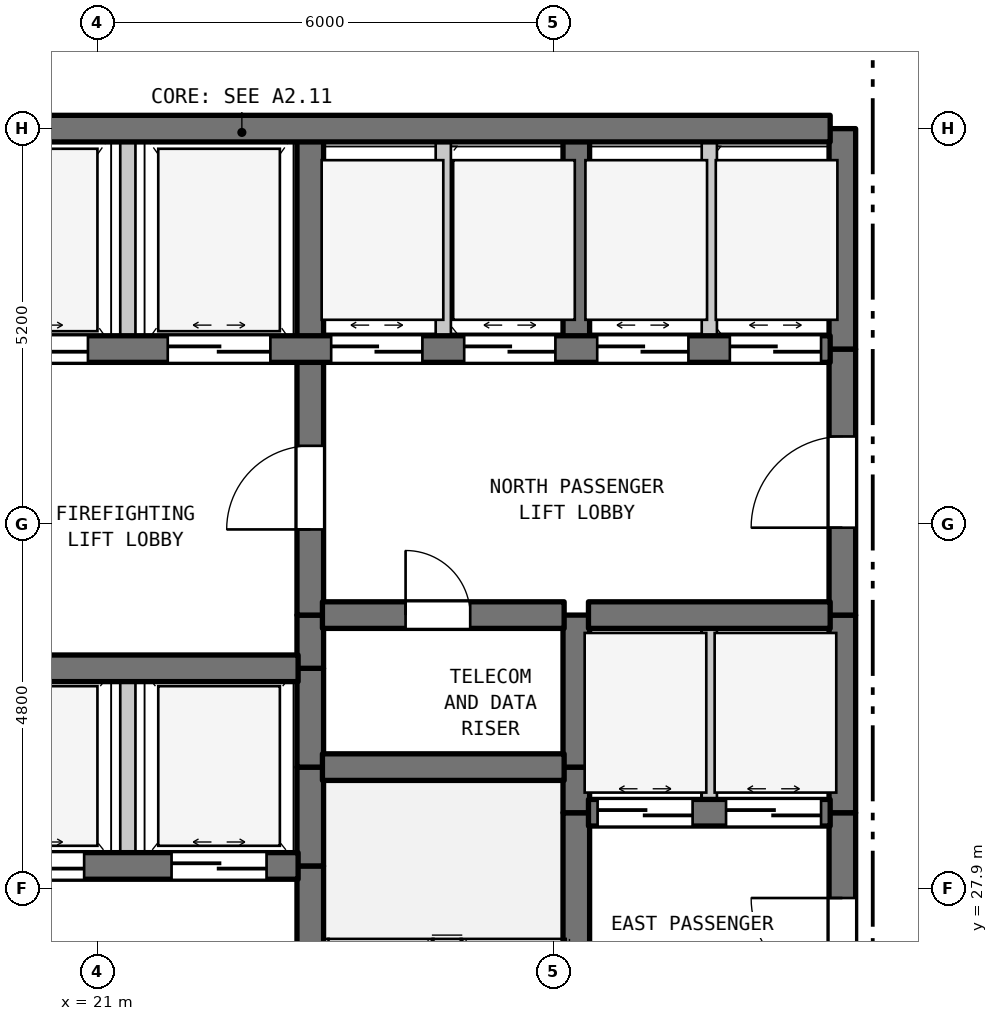
"""IFC4 building model, lengths in metres.
Left out: names, types, materials, properties, quantities, classifications, styles, units other than length and angle.
Written with IfcOpenShell. Run it as: python <this file> out.ifc"""

import sys

from ifc_helpers import new_model, si_unit, direction, frame, frame_2d, origin, place, context, subcontext, project, spatial, rectangle, extrude, element, fill, save


model = new_model("IFC4")
c1 = context("Model", 3, precision=1e-05, world=origin(), true_north=direction((0.0, 1.0)))
c2 = subcontext(c1, "Body", "Model", "MODEL_VIEW")
j1 = project(units=[si_unit("LENGTHUNIT", "METRE"), si_unit("PLANEANGLEUNIT", "RADIAN")], contexts=[c1])
p1 = place(None, origin())
s1 = spatial("IfcSite", under=j1, at=p1, CompositionType="ELEMENT")
p2 = place(p1, origin())
s2 = spatial("IfcBuilding", under=s1, at=p2, CompositionType="ELEMENT")
p3 = place(p2, frame((0.0, 0.0, 102.0)))
s3 = spatial("IfcBuildingStorey", under=s2, at=p3, CompositionType="ELEMENT", Elevation=102.0)
p4 = place(p3, frame((21.4, 28.2, 0.0), z_axis=(0.0, 0.0, 1.0), x_axis=(0.0, 1.0, 0.0)))
e1 = element("IfcWall", 1, at=p4, inside=s3, PredefinedType="STANDARD", context=c2, shape_type="SweptSolid", body=[
    extrude(rectangle(XDim=2.6, YDim=0.2, at=frame_2d((1.3, 0.0))), origin(), (0.0, 0.0, 1.0), 3.385),
])
p5 = place(p3, frame((21.4, 35.0, 0.0), z_axis=(0.0, 0.0, 1.0), x_axis=(0.0, 1.0, 0.0)))
e2 = element("IfcWall", 2, at=p5, inside=s3, PredefinedType="STANDARD", context=c2, shape_type="SweptSolid", body=[
    extrude(rectangle(XDim=2.9, YDim=0.2, at=frame_2d((1.45, 0.0))), origin(), (0.0, 0.0, 1.0), 3.385),
])
p6 = place(p3, frame((23.8, 22.7, 0.0), z_axis=(0.0, 0.0, 1.0), x_axis=(0.0, 1.0, 0.0)))
e3 = element("IfcWall", 3, at=p6, inside=s3, PredefinedType="SHEAR", context=c2, shape_type="SweptSolid", body=[
    extrude(rectangle(XDim=5.5, YDim=0.35, at=frame_2d((2.75, 0.0))), origin(), (0.0, 0.0, 1.0), 3.385),
])
p7 = place(p6, frame((0.235, 0.0, 0.0)))
e4 = element("IfcOpeningElement", 4, at=p7, cuts=e3, PredefinedType="OPENING", context=c2, shape_type="SweptSolid", body=[
    extrude(rectangle(XDim=1.1, YDim=2.15, at=frame_2d((0.55, 1.075))), frame((0.0, 0.185, 0.0), z_axis=(0.0, -1.0, 0.0), x_axis=(1.0, 0.0, 0.0)), (0.0, 0.0, 1.0), 0.37),
])
for number, where, z_axis, x_axis in (
    (5, (23.8, 28.2, 0.0), (0.0, 0.0, 1.0), (0.0, 1.0, 0.0)),
    (6, (23.8, 29.5, 0.0), (0.0, 0.0, 1.0), (0.0, 1.0, 0.0)),
):
    element("IfcWall", number, at=place(p3, frame(where, z_axis=z_axis, x_axis=x_axis)), inside=s3, PredefinedType="SHEAR", context=c2, shape_type="SweptSolid", body=[
        extrude(rectangle(XDim=1.3, YDim=0.35, at=frame_2d((0.65, 0.0))), origin(), (0.0, 0.0, 1.0), 3.385),
    ])
p8 = place(p3, frame((23.8, 30.8, 0.0), z_axis=(0.0, 0.0, 1.0), x_axis=(0.0, 1.0, 0.0)))
e7 = element("IfcWall", 7, at=p8, inside=s3, PredefinedType="SHEAR", context=c2, shape_type="SweptSolid", body=[
    extrude(rectangle(XDim=0.7, YDim=0.35, at=frame_2d((0.35, 0.0))), origin(), (0.0, 0.0, 1.0), 3.385),
])
p9 = place(p3, frame((23.8, 31.5, 0.0), z_axis=(0.0, 0.0, 1.0), x_axis=(0.0, 1.0, 0.0)))
e8 = element("IfcWall", 8, at=p9, inside=s3, PredefinedType="SHEAR", context=c2, shape_type="SweptSolid", body=[
    extrude(rectangle(XDim=3.5, YDim=0.35, at=frame_2d((1.75, 0.0))), origin(), (0.0, 0.0, 1.0), 3.385),
])
p10 = place(p9, frame((1.127, 0.0, 0.0)))
e9 = element("IfcOpeningElement", 9, at=p10, cuts=e8, PredefinedType="OPENING", context=c2, shape_type="SweptSolid", body=[
    extrude(rectangle(XDim=1.1, YDim=2.15, at=frame_2d((0.55, 1.075))), frame((0.0, 0.185, 0.0), z_axis=(0.0, -1.0, 0.0), x_axis=(1.0, 0.0, 0.0)), (0.0, 0.0, 1.0), 0.37),
])
p11 = place(p3, frame((23.8, 35.0, 0.0), z_axis=(0.0, 0.0, 1.0), x_axis=(0.0, 1.0, 0.0)))
e10 = element("IfcWall", 10, at=p11, inside=s3, PredefinedType="SHEAR", context=c2, shape_type="SweptSolid", body=[
    extrude(rectangle(XDim=2.9, YDim=0.35, at=frame_2d((1.45, 0.0))), origin(), (0.0, 0.0, 1.0), 3.385),
])
p12 = place(p3, frame((25.55, 35.0, 0.0), z_axis=(0.0, 0.0, 1.0), x_axis=(0.0, 1.0, 0.0)))
e11 = element("IfcWall", 11, at=p12, inside=s3, PredefinedType="STANDARD", context=c2, shape_type="SweptSolid", body=[
    extrude(rectangle(XDim=2.9, YDim=0.2, at=frame_2d((1.45, 0.0))), origin(), (0.0, 0.0, 1.0), 3.385),
])
p13 = place(p3, frame((27.3, 25.6, 0.0), z_axis=(0.0, 0.0, 1.0), x_axis=(0.0, 1.0, 0.0)))
e12 = element("IfcWall", 12, at=p13, inside=s3, PredefinedType="SHEAR", context=c2, shape_type="SweptSolid", body=[
    extrude(rectangle(XDim=3.3, YDim=0.35, at=frame_2d((1.65, 0.0))), origin(), (0.0, 0.0, 1.0), 3.385),
])
p14 = place(p3, frame((27.3, 28.9, 0.0), z_axis=(0.0, 0.0, 1.0), x_axis=(0.0, 1.0, 0.0)))
e13 = element("IfcWall", 13, at=p14, inside=s3, PredefinedType="SHEAR", context=c2, shape_type="SweptSolid", body=[
    extrude(rectangle(XDim=0.6, YDim=0.35, at=frame_2d((0.3, 0.0))), origin(), (0.0, 0.0, 1.0), 3.385),
])
p15 = place(p3, frame((27.3, 29.5, 0.0), z_axis=(0.0, 0.0, 1.0), x_axis=(0.0, 1.0, 0.0)))
e14 = element("IfcWall", 14, at=p15, inside=s3, PredefinedType="SHEAR", context=c2, shape_type="SweptSolid", body=[
    extrude(rectangle(XDim=2.0, YDim=0.35, at=frame_2d((1.0, 0.0))), origin(), (0.0, 0.0, 1.0), 3.385),
])
p16 = place(p3, frame((27.3, 35.0, 0.0), z_axis=(0.0, 0.0, 1.0), x_axis=(0.0, 1.0, 0.0)))
e15 = element("IfcWall", 15, at=p16, inside=s3, PredefinedType="SHEAR", context=c2, shape_type="SweptSolid", body=[
    extrude(rectangle(XDim=2.9, YDim=0.35, at=frame_2d((1.45, 0.0))), origin(), (0.0, 0.0, 1.0), 3.385),
])
p17 = place(p3, frame((29.05, 28.9, 0.0), z_axis=(0.0, 0.0, 1.0), x_axis=(0.0, 1.0, 0.0)))
e16 = element("IfcWall", 16, at=p17, inside=s3, PredefinedType="STANDARD", context=c2, shape_type="SweptSolid", body=[
    extrude(rectangle(XDim=2.6, YDim=0.2, at=frame_2d((1.3, 0.0))), origin(), (0.0, 0.0, 1.0), 3.385),
])
p18 = place(p3, frame((29.05, 35.0, 0.0), z_axis=(0.0, 0.0, 1.0), x_axis=(0.0, 1.0, 0.0)))
e17 = element("IfcWall", 17, at=p18, inside=s3, PredefinedType="STANDARD", context=c2, shape_type="SweptSolid", body=[
    extrude(rectangle(XDim=2.9, YDim=0.2, at=frame_2d((1.45, 0.0))), origin(), (0.0, 0.0, 1.0), 3.385),
])
p19 = place(p3, frame((30.8, 25.6, 0.0), z_axis=(0.0, 0.0, 1.0), x_axis=(0.0, 1.0, 0.0)))
e18 = element("IfcWall", 18, at=p19, inside=s3, PredefinedType="SHEAR", context=c2, shape_type="SweptSolid", body=[
    extrude(rectangle(XDim=3.3, YDim=0.35, at=frame_2d((1.65, 0.0))), origin(), (0.0, 0.0, 1.0), 3.385),
])
p20 = place(p19, frame((0.978, 0.0, 0.0)))
e19 = element("IfcOpeningElement", 19, at=p20, cuts=e18, PredefinedType="OPENING", context=c2, shape_type="SweptSolid", body=[
    extrude(rectangle(XDim=1.2, YDim=2.2, at=frame_2d((0.6, 1.1))), frame((0.0, 0.185, 0.0), z_axis=(0.0, -1.0, 0.0), x_axis=(1.0, 0.0, 0.0)), (0.0, 0.0, 1.0), 0.37),
])
p21 = place(p3, frame((30.8, 28.9, 0.0), z_axis=(0.0, 0.0, 1.0), x_axis=(0.0, 1.0, 0.0)))
e20 = element("IfcWall", 20, at=p21, inside=s3, PredefinedType="SHEAR", context=c2, shape_type="SweptSolid", body=[
    extrude(rectangle(XDim=2.6, YDim=0.35, at=frame_2d((1.3, 0.0))), origin(), (0.0, 0.0, 1.0), 3.385),
])
p22 = place(p3, frame((30.8, 31.5, 0.0), z_axis=(0.0, 0.0, 1.0), x_axis=(0.0, 1.0, 0.0)))
e21 = element("IfcWall", 21, at=p22, inside=s3, PredefinedType="SHEAR", context=c2, shape_type="SweptSolid", body=[
    extrude(rectangle(XDim=3.5, YDim=0.35, at=frame_2d((1.75, 0.0))), origin(), (0.0, 0.0, 1.0), 3.385),
])
p23 = place(p22, frame((1.15, 0.0, 0.0)))
e22 = element("IfcOpeningElement", 22, at=p23, cuts=e21, PredefinedType="OPENING", context=c2, shape_type="SweptSolid", body=[
    extrude(rectangle(XDim=1.2, YDim=2.2, at=frame_2d((0.6, 1.1))), frame((0.0, 0.185, 0.0), z_axis=(0.0, -1.0, 0.0), x_axis=(1.0, 0.0, 0.0)), (0.0, 0.0, 1.0), 0.37),
])
p24 = place(p3, frame((30.8, 35.0, 0.0), z_axis=(0.0, 0.0, 1.0), x_axis=(0.0, 1.0, 0.0)))
e23 = element("IfcWall", 23, at=p24, inside=s3, PredefinedType="SHEAR", context=c2, shape_type="SweptSolid", body=[
    extrude(rectangle(XDim=2.9, YDim=0.35, at=frame_2d((1.45, 0.0))), origin(), (0.0, 0.0, 1.0), 3.385),
])
p25 = place(p3, frame((19.16, 28.2, 0.0), z_axis=(0.0, 0.0, 1.0), x_axis=(1.0, 0.0, 0.0)))
e24 = element("IfcWall", 24, at=p25, inside=s3, PredefinedType="SHEAR", context=c2, shape_type="SweptSolid", body=[
    extrude(rectangle(XDim=4.48, YDim=0.35, at=frame_2d((2.24, 0.0))), origin(), (0.0, 0.0, 1.0), 3.385),
])
p26 = place(p25, frame((0.415, 0.0, 0.0)))
e25 = element("IfcOpeningElement", 25, at=p26, cuts=e24, PredefinedType="OPENING", context=c2, shape_type="SweptSolid", body=[
    extrude(rectangle(XDim=1.25, YDim=2.2, at=frame_2d((0.625, 1.1))), frame((0.0, 0.185, 0.0), z_axis=(0.0, -1.0, 0.0), x_axis=(1.0, 0.0, 0.0)), (0.0, 0.0, 1.0), 0.37),
])
p27 = place(p25, frame((2.815, 0.0, 0.0)))
e26 = element("IfcOpeningElement", 26, at=p27, cuts=e24, PredefinedType="OPENING", context=c2, shape_type="SweptSolid", body=[
    extrude(rectangle(XDim=1.25, YDim=2.2, at=frame_2d((0.625, 1.1))), frame((0.0, 0.185, 0.0), z_axis=(0.0, -1.0, 0.0), x_axis=(1.0, 0.0, 0.0)), (0.0, 0.0, 1.0), 0.37),
])
p28 = place(p3, frame((27.46, 28.9, 0.0), z_axis=(0.0, 0.0, 1.0), x_axis=(1.0, 0.0, 0.0)))
e27 = element("IfcWall", 27, at=p28, inside=s3, PredefinedType="SHEAR", context=c2, shape_type="SweptSolid", body=[
    extrude(rectangle(XDim=3.18, YDim=0.35, at=frame_2d((1.59, 0.0))), origin(), (0.0, 0.0, 1.0), 3.385),
])
p29 = place(p28, frame((0.12, 0.0, 0.0)))
e28 = element("IfcOpeningElement", 28, at=p29, cuts=e27, PredefinedType="OPENING", context=c2, shape_type="SweptSolid", body=[
    extrude(rectangle(XDim=1.25, YDim=2.2, at=frame_2d((0.625, 1.1))), frame((0.0, 0.185, 0.0), z_axis=(0.0, -1.0, 0.0), x_axis=(1.0, 0.0, 0.0)), (0.0, 0.0, 1.0), 0.37),
])
p30 = place(p28, frame((1.81, 0.0, 0.0)))
e29 = element("IfcOpeningElement", 29, at=p30, cuts=e27, PredefinedType="OPENING", context=c2, shape_type="SweptSolid", body=[
    extrude(rectangle(XDim=1.25, YDim=2.2, at=frame_2d((0.625, 1.1))), frame((0.0, 0.185, 0.0), z_axis=(0.0, -1.0, 0.0), x_axis=(1.0, 0.0, 0.0)), (0.0, 0.0, 1.0), 0.37),
])
p31 = place(p3, frame((23.96, 29.5, 0.0), z_axis=(0.0, 0.0, 1.0), x_axis=(1.0, 0.0, 0.0)))
e30 = element("IfcWall", 30, at=p31, inside=s3, PredefinedType="SHEAR", context=c2, shape_type="SweptSolid", body=[
    extrude(rectangle(XDim=3.18, YDim=0.35, at=frame_2d((1.59, 0.0))), origin(), (0.0, 0.0, 1.0), 3.385),
])
p32 = place(p3, frame((19.16, 30.8, 0.0), z_axis=(0.0, 0.0, 1.0), x_axis=(1.0, 0.0, 0.0)))
e31 = element("IfcWall", 31, at=p32, inside=s3, PredefinedType="SHEAR", context=c2, shape_type="SweptSolid", body=[
    extrude(rectangle(XDim=4.48, YDim=0.35, at=frame_2d((2.24, 0.0))), origin(), (0.0, 0.0, 1.0), 3.385),
])
p33 = place(p3, frame((23.96, 31.5, 0.0), z_axis=(0.0, 0.0, 1.0), x_axis=(1.0, 0.0, 0.0)))
e32 = element("IfcWall", 32, at=p33, inside=s3, PredefinedType="SHEAR", context=c2, shape_type="SweptSolid", body=[
    extrude(rectangle(XDim=3.18, YDim=0.35, at=frame_2d((1.59, 0.0))), origin(), (0.0, 0.0, 1.0), 3.385),
])
p34 = place(p33, frame((1.094, 0.0, 0.0)))
e33 = element("IfcOpeningElement", 33, at=p34, cuts=e32, PredefinedType="OPENING", context=c2, shape_type="SweptSolid", body=[
    extrude(rectangle(XDim=0.85, YDim=2.1, at=frame_2d((0.425, 1.05))), frame((0.0, 0.185, 0.0), z_axis=(0.0, -1.0, 0.0), x_axis=(1.0, 0.0, 0.0)), (0.0, 0.0, 1.0), 0.37),
])
p35 = place(p3, frame((27.46, 31.5, 0.0), z_axis=(0.0, 0.0, 1.0), x_axis=(1.0, 0.0, 0.0)))
e34 = element("IfcWall", 34, at=p35, inside=s3, PredefinedType="SHEAR", context=c2, shape_type="SweptSolid", body=[
    extrude(rectangle(XDim=3.18, YDim=0.35, at=frame_2d((1.59, 0.0))), origin(), (0.0, 0.0, 1.0), 3.385),
])
p36 = place(p3, frame((19.16, 35.0, 0.0), z_axis=(0.0, 0.0, 1.0), x_axis=(1.0, 0.0, 0.0)))
e35 = element("IfcWall", 35, at=p36, inside=s3, PredefinedType="SHEAR", context=c2, shape_type="SweptSolid", body=[
    extrude(rectangle(XDim=11.48, YDim=0.35, at=frame_2d((5.74, 0.0))), origin(), (0.0, 0.0, 1.0), 3.385),
])
p37 = place(p36, frame((0.365, 0.0, 0.0)))
e36 = element("IfcOpeningElement", 36, at=p37, cuts=e35, PredefinedType="OPENING", context=c2, shape_type="SweptSolid", body=[
    extrude(rectangle(XDim=1.35, YDim=2.2, at=frame_2d((0.675, 1.1))), frame((0.0, 0.185, 0.0), z_axis=(0.0, -1.0, 0.0), x_axis=(1.0, 0.0, 0.0)), (0.0, 0.0, 1.0), 0.37),
])
p38 = place(p36, frame((2.765, 0.0, 0.0)))
e37 = element("IfcOpeningElement", 37, at=p38, cuts=e35, PredefinedType="OPENING", context=c2, shape_type="SweptSolid", body=[
    extrude(rectangle(XDim=1.35, YDim=2.2, at=frame_2d((0.675, 1.1))), frame((0.0, 0.185, 0.0), z_axis=(0.0, -1.0, 0.0), x_axis=(1.0, 0.0, 0.0)), (0.0, 0.0, 1.0), 0.37),
])
p39 = place(p36, frame((4.915, 0.0, 0.0)))
e38 = element("IfcOpeningElement", 38, at=p39, cuts=e35, PredefinedType="OPENING", context=c2, shape_type="SweptSolid", body=[
    extrude(rectangle(XDim=1.2, YDim=2.2, at=frame_2d((0.6, 1.1))), frame((0.0, 0.185, 0.0), z_axis=(0.0, -1.0, 0.0), x_axis=(1.0, 0.0, 0.0)), (0.0, 0.0, 1.0), 0.37),
])
p40 = place(p36, frame((6.665, 0.0, 0.0)))
e39 = element("IfcOpeningElement", 39, at=p40, cuts=e35, PredefinedType="OPENING", context=c2, shape_type="SweptSolid", body=[
    extrude(rectangle(XDim=1.2, YDim=2.2, at=frame_2d((0.6, 1.1))), frame((0.0, 0.185, 0.0), z_axis=(0.0, -1.0, 0.0), x_axis=(1.0, 0.0, 0.0)), (0.0, 0.0, 1.0), 0.37),
])
p41 = place(p36, frame((8.415, 0.0, 0.0)))
e40 = element("IfcOpeningElement", 40, at=p41, cuts=e35, PredefinedType="OPENING", context=c2, shape_type="SweptSolid", body=[
    extrude(rectangle(XDim=1.2, YDim=2.2, at=frame_2d((0.6, 1.1))), frame((0.0, 0.185, 0.0), z_axis=(0.0, -1.0, 0.0), x_axis=(1.0, 0.0, 0.0)), (0.0, 0.0, 1.0), 0.37),
])
p42 = place(p36, frame((10.16, 0.0, 0.0)))
e41 = element("IfcOpeningElement", 41, at=p42, cuts=e35, PredefinedType="OPENING", context=c2, shape_type="SweptSolid", body=[
    extrude(rectangle(XDim=1.2, YDim=2.2, at=frame_2d((0.6, 1.1))), frame((0.0, 0.185, 0.0), z_axis=(0.0, -1.0, 0.0), x_axis=(1.0, 0.0, 0.0)), (0.0, 0.0, 1.0), 0.37),
])
p43 = place(p3, frame((19.16, 37.9, 0.0), z_axis=(0.0, 0.0, 1.0), x_axis=(1.0, 0.0, 0.0)))
e42 = element("IfcWall", 42, at=p43, inside=s3, PredefinedType="SHEAR", context=c2, shape_type="SweptSolid", body=[
    extrude(rectangle(XDim=11.48, YDim=0.35, at=frame_2d((5.74, 0.0))), origin(), (0.0, 0.0, 1.0), 3.385),
])
p44 = place(p10, origin())
e43 = element("IfcDoor", 43, at=p44, inside=s3, OperationType="SINGLE_SWING_LEFT", PredefinedType="DOOR", context=c2, shape_type="SweptSolid", body=[
    extrude(rectangle(XDim=1.1, YDim=2.15, at=frame_2d((0.55, 1.075))), frame((0.0, 0.025, 0.0), z_axis=(0.0, -1.0, 0.0), x_axis=(1.0, 0.0, 0.0)), (0.0, 0.0, 1.0), 0.05),
])
fill(e9, e43)
p45 = place(p20, origin())
e44 = element("IfcDoor", 44, at=p45, inside=s3, OperationType="SINGLE_SWING_RIGHT", PredefinedType="DOOR", context=c2, shape_type="SweptSolid", body=[
    extrude(rectangle(XDim=1.2, YDim=2.2, at=frame_2d((0.6, 1.1))), frame((0.0, 0.025, 0.0), z_axis=(0.0, -1.0, 0.0), x_axis=(1.0, 0.0, 0.0)), (0.0, 0.0, 1.0), 0.05),
])
fill(e19, e44)
p46 = place(p23, origin())
e45 = element("IfcDoor", 45, at=p46, inside=s3, OperationType="SINGLE_SWING_LEFT", PredefinedType="DOOR", context=c2, shape_type="SweptSolid", body=[
    extrude(rectangle(XDim=1.2, YDim=2.2, at=frame_2d((0.6, 1.1))), frame((0.0, 0.025, 0.0), z_axis=(0.0, -1.0, 0.0), x_axis=(1.0, 0.0, 0.0)), (0.0, 0.0, 1.0), 0.05),
])
fill(e22, e45)
p47 = place(p26, origin())
e46 = element("IfcDoor", 46, at=p47, inside=s3, OperationType="DOUBLE_DOOR_SLIDING", PredefinedType="DOOR", context=c2, shape_type="SweptSolid", body=[
    extrude(rectangle(XDim=1.25, YDim=2.2, at=frame_2d((0.625, 1.1))), frame((0.0, 0.025, 0.0), z_axis=(0.0, -1.0, 0.0), x_axis=(1.0, 0.0, 0.0)), (0.0, 0.0, 1.0), 0.05),
])
fill(e25, e46)
p48 = place(p27, origin())
e47 = element("IfcDoor", 47, at=p48, inside=s3, OperationType="DOUBLE_DOOR_SLIDING", PredefinedType="DOOR", context=c2, shape_type="SweptSolid", body=[
    extrude(rectangle(XDim=1.25, YDim=2.2, at=frame_2d((0.625, 1.1))), frame((0.0, 0.025, 0.0), z_axis=(0.0, -1.0, 0.0), x_axis=(1.0, 0.0, 0.0)), (0.0, 0.0, 1.0), 0.05),
])
fill(e26, e47)
p49 = place(p29, origin())
e48 = element("IfcDoor", 48, at=p49, inside=s3, OperationType="DOUBLE_DOOR_SLIDING", PredefinedType="DOOR", context=c2, shape_type="SweptSolid", body=[
    extrude(rectangle(XDim=1.25, YDim=2.2, at=frame_2d((0.625, 1.1))), frame((0.0, 0.025, 0.0), z_axis=(0.0, -1.0, 0.0), x_axis=(1.0, 0.0, 0.0)), (0.0, 0.0, 1.0), 0.05),
])
fill(e28, e48)
p50 = place(p30, origin())
e49 = element("IfcDoor", 49, at=p50, inside=s3, OperationType="DOUBLE_DOOR_SLIDING", PredefinedType="DOOR", context=c2, shape_type="SweptSolid", body=[
    extrude(rectangle(XDim=1.25, YDim=2.2, at=frame_2d((0.625, 1.1))), frame((0.0, 0.025, 0.0), z_axis=(0.0, -1.0, 0.0), x_axis=(1.0, 0.0, 0.0)), (0.0, 0.0, 1.0), 0.05),
])
fill(e29, e49)
p51 = place(p34, origin())
e50 = element("IfcDoor", 50, at=p51, inside=s3, OperationType="SINGLE_SWING_LEFT", PredefinedType="DOOR", context=c2, shape_type="SweptSolid", body=[
    extrude(rectangle(XDim=0.85, YDim=2.1, at=frame_2d((0.425, 1.05))), frame((0.0, 0.025, 0.0), z_axis=(0.0, -1.0, 0.0), x_axis=(1.0, 0.0, 0.0)), (0.0, 0.0, 1.0), 0.05),
])
fill(e33, e50)
p52 = place(p37, origin())
e51 = element("IfcDoor", 51, at=p52, inside=s3, OperationType="DOUBLE_DOOR_SLIDING", PredefinedType="DOOR", context=c2, shape_type="SweptSolid", body=[
    extrude(rectangle(XDim=1.35, YDim=2.2, at=frame_2d((0.675, 1.1))), frame((0.0, 0.025, 0.0), z_axis=(0.0, -1.0, 0.0), x_axis=(1.0, 0.0, 0.0)), (0.0, 0.0, 1.0), 0.05),
])
fill(e36, e51)
p53 = place(p38, origin())
e52 = element("IfcDoor", 52, at=p53, inside=s3, OperationType="DOUBLE_DOOR_SLIDING", PredefinedType="DOOR", context=c2, shape_type="SweptSolid", body=[
    extrude(rectangle(XDim=1.35, YDim=2.2, at=frame_2d((0.675, 1.1))), frame((0.0, 0.025, 0.0), z_axis=(0.0, -1.0, 0.0), x_axis=(1.0, 0.0, 0.0)), (0.0, 0.0, 1.0), 0.05),
])
fill(e37, e52)
p54 = place(p39, origin())
e53 = element("IfcDoor", 53, at=p54, inside=s3, OperationType="DOUBLE_DOOR_SLIDING", PredefinedType="DOOR", context=c2, shape_type="SweptSolid", body=[
    extrude(rectangle(XDim=1.2, YDim=2.2, at=frame_2d((0.6, 1.1))), frame((0.0, 0.025, 0.0), z_axis=(0.0, -1.0, 0.0), x_axis=(1.0, 0.0, 0.0)), (0.0, 0.0, 1.0), 0.05),
])
fill(e38, e53)
p55 = place(p40, origin())
e54 = element("IfcDoor", 54, at=p55, inside=s3, OperationType="DOUBLE_DOOR_SLIDING", PredefinedType="DOOR", context=c2, shape_type="SweptSolid", body=[
    extrude(rectangle(XDim=1.2, YDim=2.2, at=frame_2d((0.6, 1.1))), frame((0.0, 0.025, 0.0), z_axis=(0.0, -1.0, 0.0), x_axis=(1.0, 0.0, 0.0)), (0.0, 0.0, 1.0), 0.05),
])
fill(e39, e54)
p56 = place(p41, origin())
e55 = element("IfcDoor", 55, at=p56, inside=s3, OperationType="DOUBLE_DOOR_SLIDING", PredefinedType="DOOR", context=c2, shape_type="SweptSolid", body=[
    extrude(rectangle(XDim=1.2, YDim=2.2, at=frame_2d((0.6, 1.1))), frame((0.0, 0.025, 0.0), z_axis=(0.0, -1.0, 0.0), x_axis=(1.0, 0.0, 0.0)), (0.0, 0.0, 1.0), 0.05),
])
fill(e40, e55)
p57 = place(p42, origin())
e56 = element("IfcDoor", 56, at=p57, inside=s3, OperationType="DOUBLE_DOOR_SLIDING", PredefinedType="DOOR", context=c2, shape_type="SweptSolid", body=[
    extrude(rectangle(XDim=1.2, YDim=2.2, at=frame_2d((0.6, 1.1))), frame((0.0, 0.025, 0.0), z_axis=(0.0, -1.0, 0.0), x_axis=(1.0, 0.0, 0.0)), (0.0, 0.0, 1.0), 0.05),
])
fill(e41, e56)
save(model, sys.argv[1])
